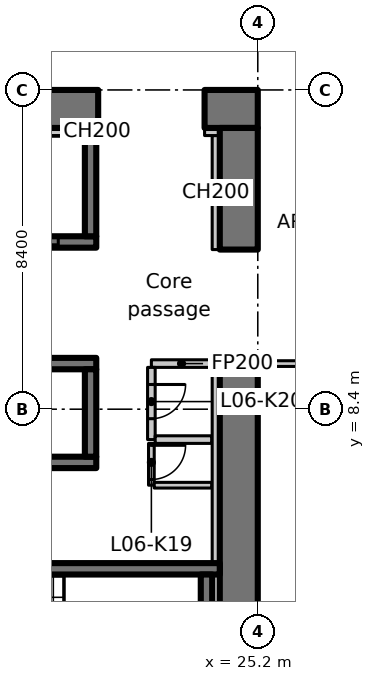
"""IFC4 building model, lengths in metres.
Left out: names, types, materials, properties, quantities, classifications, styles, units other than length and angle.
Written with IfcOpenShell. Run it as: python <this file> out.ifc"""

import sys

from ifc_helpers import new_model, si_unit, direction, frame, frame_2d, origin, place, context, subcontext, project, spatial, rectangle, extrude, element, fill, save


model = new_model("IFC4")
c1 = context("Model", 3, precision=1e-05, world=origin(), true_north=direction((0.0, 1.0)))
c2 = subcontext(c1, "Body", "Model", "MODEL_VIEW")
j1 = project(units=[si_unit("LENGTHUNIT", "METRE"), si_unit("PLANEANGLEUNIT", "RADIAN")], contexts=[c1])
p1 = place(None, origin())
s1 = spatial("IfcSite", under=j1, at=p1, CompositionType="ELEMENT")
p2 = place(p1, origin())
s2 = spatial("IfcBuilding", under=s1, at=p2, CompositionType="ELEMENT")
p3 = place(p2, frame((0.0, 0.0, 36.5)))
s3 = spatial("IfcBuildingStorey", under=s2, at=p3, CompositionType="ELEMENT", Elevation=36.5)
p4 = place(p3, frame((-1.1, 16.3, 0.0), z_axis=(0.0, 0.0, 1.0), x_axis=(1.0, 0.0, 0.0)))
e1 = element("IfcWall", 1, at=p4, inside=s3, PredefinedType="SHEAR", context=c2, shape_type="SweptSolid", body=[
    extrude(rectangle(XDim=22.1, YDim=1.0, at=frame_2d((11.05, 0.0))), origin(), (0.0, 0.0, 1.0), 3.35),
])
p5 = place(p4, frame((3.15, 0.0, 0.0)))
e2 = element("IfcOpeningElement", 2, at=p5, cuts=e1, PredefinedType="OPENING", context=c2, shape_type="SweptSolid", body=[
    extrude(rectangle(XDim=1.1, YDim=2.3, at=frame_2d((0.55, 1.15))), frame((0.0, 0.51, 0.0), z_axis=(0.0, -1.0, 0.0), x_axis=(1.0, 0.0, 0.0)), (0.0, 0.0, 1.0), 1.02),
])
p6 = place(p3, frame((23.8, 16.3, 0.0), z_axis=(0.0, 0.0, 1.0), x_axis=(1.0, 0.0, 0.0)))
e3 = element("IfcWall", 3, at=p6, inside=s3, PredefinedType="SHEAR", context=c2, shape_type="SweptSolid", body=[
    extrude(rectangle(XDim=1.4, YDim=1.0, at=frame_2d((0.7, 0.0))), origin(), (0.0, 0.0, 1.0), 3.35),
])
p7 = place(p3, frame((24.7, 1.0, 0.0), z_axis=(0.0, 0.0, 1.0), x_axis=(0.0, 1.0, 0.0)))
e4 = element("IfcWall", 4, at=p7, inside=s3, PredefinedType="SHEAR", context=c2, shape_type="SweptSolid", body=[
    extrude(rectangle(XDim=8.8, YDim=1.0, at=frame_2d((4.4, 0.0))), origin(), (0.0, 0.0, 1.0), 3.35),
])
p8 = place(p3, frame((24.7, 12.6, 0.0), z_axis=(0.0, 0.0, 1.0), x_axis=(0.0, 1.0, 0.0)))
e5 = element("IfcWall", 5, at=p8, inside=s3, PredefinedType="SHEAR", context=c2, shape_type="SweptSolid", body=[
    extrude(rectangle(XDim=3.2, YDim=1.0, at=frame_2d((1.6, 0.0))), origin(), (0.0, 0.0, 1.0), 3.35),
])
p9 = place(p3, frame((24.1, 12.6, 0.0), z_axis=(0.0, 0.0, 1.0), x_axis=(0.0, 1.0, 0.0)))
e6 = element("IfcWall", 6, at=p9, inside=s3, PredefinedType="PARTITIONING", context=c2, shape_type="SweptSolid", body=[
    extrude(rectangle(XDim=3.0, YDim=0.2, at=frame_2d((1.5, 0.0))), origin(), (0.0, 0.0, 1.0), 3.35),
])
p10 = place(p3, frame((23.8, 15.7, 0.0), z_axis=(0.0, 0.0, 1.0), x_axis=(1.0, 0.0, 0.0)))
e7 = element("IfcWall", 7, at=p10, inside=s3, PredefinedType="PARTITIONING", context=c2, shape_type="SweptSolid", body=[
    extrude(rectangle(XDim=0.4, YDim=0.2, at=frame_2d((0.2, 0.0))), origin(), (0.0, 0.0, 1.0), 3.35),
])
p11 = place(p3, frame((1.0, 7.0, 0.0), z_axis=(0.0, 0.0, 1.0), x_axis=(1.0, 0.0, 0.0)))
e8 = element("IfcWall", 8, at=p11, inside=s3, PredefinedType="SHEAR", context=c2, shape_type="SweptSolid", body=[
    extrude(rectangle(XDim=19.95, YDim=0.3, at=frame_2d((9.975, 0.0))), origin(), (0.0, 0.0, 1.0), 3.35),
])
p12 = place(p3, frame((1.0, 9.6, 0.0), z_axis=(0.0, 0.0, 1.0), x_axis=(1.0, 0.0, 0.0)))
e9 = element("IfcWall", 9, at=p12, inside=s3, PredefinedType="SHEAR", context=c2, shape_type="SweptSolid", body=[
    extrude(rectangle(XDim=19.95, YDim=0.3, at=frame_2d((9.975, 0.0))), origin(), (0.0, 0.0, 1.0), 3.35),
])
p13 = place(p12, frame((1.05, 0.0, 0.0)))
e10 = element("IfcOpeningElement", 10, at=p13, cuts=e9, PredefinedType="OPENING", context=c2, shape_type="SweptSolid", body=[
    extrude(rectangle(XDim=1.1, YDim=2.3, at=frame_2d((0.55, 1.15))), frame((0.0, 0.16, 0.0), z_axis=(0.0, -1.0, 0.0), x_axis=(1.0, 0.0, 0.0)), (0.0, 0.0, 1.0), 0.32),
])
p14 = place(p12, frame((3.85, 0.0, 0.0)))
e11 = element("IfcOpeningElement", 11, at=p14, cuts=e9, PredefinedType="OPENING", context=c2, shape_type="SweptSolid", body=[
    extrude(rectangle(XDim=1.1, YDim=2.3, at=frame_2d((0.55, 1.15))), frame((0.0, 0.16, 0.0), z_axis=(0.0, -1.0, 0.0), x_axis=(1.0, 0.0, 0.0)), (0.0, 0.0, 1.0), 0.32),
])
p15 = place(p12, frame((6.65, 0.0, 0.0)))
e12 = element("IfcOpeningElement", 12, at=p15, cuts=e9, PredefinedType="OPENING", context=c2, shape_type="SweptSolid", body=[
    extrude(rectangle(XDim=1.1, YDim=2.3, at=frame_2d((0.55, 1.15))), frame((0.0, 0.16, 0.0), z_axis=(0.0, -1.0, 0.0), x_axis=(1.0, 0.0, 0.0)), (0.0, 0.0, 1.0), 0.32),
])
p16 = place(p12, frame((9.45, 0.0, 0.0)))
e13 = element("IfcOpeningElement", 13, at=p16, cuts=e9, PredefinedType="OPENING", context=c2, shape_type="SweptSolid", body=[
    extrude(rectangle(XDim=1.1, YDim=2.3, at=frame_2d((0.55, 1.15))), frame((0.0, 0.16, 0.0), z_axis=(0.0, -1.0, 0.0), x_axis=(1.0, 0.0, 0.0)), (0.0, 0.0, 1.0), 0.32),
])
p17 = place(p12, frame((12.25, 0.0, 0.0)))
e14 = element("IfcOpeningElement", 14, at=p17, cuts=e9, PredefinedType="OPENING", context=c2, shape_type="SweptSolid", body=[
    extrude(rectangle(XDim=1.1, YDim=2.3, at=frame_2d((0.55, 1.15))), frame((0.0, 0.16, 0.0), z_axis=(0.0, -1.0, 0.0), x_axis=(1.0, 0.0, 0.0)), (0.0, 0.0, 1.0), 0.32),
])
p18 = place(p12, frame((15.05, 0.0, 0.0)))
e15 = element("IfcOpeningElement", 15, at=p18, cuts=e9, PredefinedType="OPENING", context=c2, shape_type="SweptSolid", body=[
    extrude(rectangle(XDim=1.1, YDim=2.3, at=frame_2d((0.55, 1.15))), frame((0.0, 0.16, 0.0), z_axis=(0.0, -1.0, 0.0), x_axis=(1.0, 0.0, 0.0)), (0.0, 0.0, 1.0), 0.32),
])
p19 = place(p3, frame((20.8, 7.15, 0.0), z_axis=(0.0, 0.0, 1.0), x_axis=(0.0, 1.0, 0.0)))
e16 = element("IfcWall", 16, at=p19, inside=s3, PredefinedType="SHEAR", context=c2, shape_type="SweptSolid", body=[
    extrude(rectangle(XDim=2.3, YDim=0.3, at=frame_2d((1.15, 0.0))), origin(), (0.0, 0.0, 1.0), 3.35),
])
p20 = place(p3, frame((15.05, 12.8, 0.0), z_axis=(0.0, 0.0, 1.0), x_axis=(1.0, 0.0, 0.0)))
e17 = element("IfcWall", 17, at=p20, inside=s3, PredefinedType="SHEAR", context=c2, shape_type="SweptSolid", body=[
    extrude(rectangle(XDim=5.9, YDim=0.3, at=frame_2d((2.95, 0.0))), origin(), (0.0, 0.0, 1.0), 3.35),
])
p21 = place(p20, frame((3.8, 0.0, 0.0)))
e18 = element("IfcOpeningElement", 18, at=p21, cuts=e17, PredefinedType="OPENING", context=c2, shape_type="SweptSolid", body=[
    extrude(rectangle(XDim=1.1, YDim=2.3, at=frame_2d((0.55, 1.15))), frame((0.0, 0.16, 0.0), z_axis=(0.0, -1.0, 0.0), x_axis=(1.0, 0.0, 0.0)), (0.0, 0.0, 1.0), 0.32),
])
p22 = place(p3, frame((20.8, 12.95, 0.0), z_axis=(0.0, 0.0, 1.0), x_axis=(0.0, 1.0, 0.0)))
e19 = element("IfcWall", 19, at=p22, inside=s3, PredefinedType="SHEAR", context=c2, shape_type="SweptSolid", body=[
    extrude(rectangle(XDim=2.85, YDim=0.3, at=frame_2d((1.425, 0.0))), origin(), (0.0, 0.0, 1.0), 3.35),
])
p23 = place(p3, frame((15.8, 4.2, 0.0), z_axis=(0.0, 0.0, 1.0), x_axis=(1.0, 0.0, 0.0)))
e20 = element("IfcWall", 20, at=p23, inside=s3, PredefinedType="SHEAR", context=c2, shape_type="SweptSolid", body=[
    extrude(rectangle(XDim=8.4, YDim=0.3, at=frame_2d((4.2, 0.0))), origin(), (0.0, 0.0, 1.0), 3.35),
])
p24 = place(p23, frame((0.4, 0.0, 0.0)))
e21 = element("IfcOpeningElement", 21, at=p24, cuts=e20, PredefinedType="OPENING", context=c2, shape_type="SweptSolid", body=[
    extrude(rectangle(XDim=1.0, YDim=2.1, at=frame_2d((0.5, 1.05))), frame((0.0, 0.16, 0.0), z_axis=(0.0, -1.0, 0.0), x_axis=(1.0, 0.0, 0.0)), (0.0, 0.0, 1.0), 0.32),
])
p25 = place(p3, frame((23.85, 1.5, 0.0), z_axis=(0.0, 0.0, 1.0), x_axis=(0.0, 1.0, 0.0)))
e22 = element("IfcWall", 22, at=p25, inside=s3, PredefinedType="SHEAR", context=c2, shape_type="SweptSolid", body=[
    extrude(rectangle(XDim=2.55, YDim=0.3, at=frame_2d((1.275, 0.0))), origin(), (0.0, 0.0, 1.0), 3.35),
])
p26 = place(p3, frame((23.988, 9.6, 0.0), z_axis=(0.0, 0.0, 1.0), x_axis=(-1.0, 0.0, 0.0)))
e23 = element("IfcWall", 23, at=p26, inside=s3, PredefinedType="PARTITIONING", context=c2, shape_type="SweptSolid", body=[
    extrude(rectangle(XDim=1.588, YDim=0.2, at=frame_2d((0.794, 0.0))), origin(), (0.0, 0.0, 1.0), 3.35),
])
p27 = place(p3, frame((22.4, 9.5, 0.0), z_axis=(0.0, 0.0, 1.0), x_axis=(0.0, -1.0, 0.0)))
e24 = element("IfcWall", 24, at=p27, inside=s3, PredefinedType="PARTITIONING", context=c2, shape_type="SweptSolid", body=[
    extrude(rectangle(XDim=1.9, YDim=0.2, at=frame_2d((0.95, 0.0))), origin(), (0.0, 0.0, 1.0), 3.35),
])
p28 = place(p27, frame((0.45, 0.0, 0.0)))
e25 = element("IfcOpeningElement", 25, at=p28, cuts=e24, PredefinedType="OPENING", context=c2, shape_type="SweptSolid", body=[
    extrude(rectangle(XDim=0.9, YDim=2.1, at=frame_2d((0.45, 1.05))), frame((0.0, 0.11, 0.0), z_axis=(0.0, -1.0, 0.0), x_axis=(1.0, 0.0, 0.0)), (0.0, 0.0, 1.0), 0.22),
])
p29 = place(p3, frame((22.5, 7.6, 0.0), z_axis=(0.0, 0.0, 1.0), x_axis=(1.0, 0.0, 0.0)))
e26 = element("IfcWall", 26, at=p29, inside=s3, PredefinedType="PARTITIONING", context=c2, shape_type="SweptSolid", body=[
    extrude(rectangle(XDim=1.488, YDim=0.2, at=frame_2d((0.744, 0.0))), origin(), (0.0, 0.0, 1.0), 3.35),
])
p30 = place(p3, frame((22.4, 7.5, 0.0), z_axis=(0.0, 0.0, 1.0), x_axis=(0.0, -1.0, 0.0)))
e27 = element("IfcWall", 27, at=p30, inside=s3, PredefinedType="PARTITIONING", context=c2, shape_type="SweptSolid", body=[
    extrude(rectangle(XDim=1.1, YDim=0.15, at=frame_2d((0.55, 0.0))), origin(), (0.0, 0.0, 1.0), 3.35),
])
p31 = place(p30, frame((0.05, 0.0, 0.0)))
e28 = element("IfcOpeningElement", 28, at=p31, cuts=e27, PredefinedType="OPENING", context=c2, shape_type="SweptSolid", body=[
    extrude(rectangle(XDim=0.9, YDim=2.1, at=frame_2d((0.45, 1.05))), frame((0.0, 0.085, 0.0), z_axis=(0.0, -1.0, 0.0), x_axis=(1.0, 0.0, 0.0)), (0.0, 0.0, 1.0), 0.17),
])
p32 = place(p3, frame((22.475, 6.4, 0.0), z_axis=(0.0, 0.0, 1.0), x_axis=(1.0, 0.0, 0.0)))
e29 = element("IfcWall", 29, at=p32, inside=s3, PredefinedType="PARTITIONING", context=c2, shape_type="SweptSolid", body=[
    extrude(rectangle(XDim=1.513, YDim=0.15, at=frame_2d((0.756, 0.0))), origin(), (0.0, 0.0, 1.0), 3.35),
])
p33 = place(p3, frame((18.15, 15.7, 0.0), z_axis=(0.0, 0.0, 1.0), x_axis=(1.0, 0.0, 0.0)))
e30 = element("IfcWall", 30, at=p33, inside=s3, PredefinedType="PARTITIONING", context=c2, shape_type="SweptSolid", body=[
    extrude(rectangle(XDim=2.5, YDim=0.2, at=frame_2d((1.25, 0.0))), origin(), (0.0, 0.0, 1.0), 3.35),
])
p34 = place(p3, frame((20.95, 15.7, 0.0), z_axis=(0.0, 0.0, 1.0), x_axis=(1.0, 0.0, 0.0)))
e31 = element("IfcWall", 31, at=p34, inside=s3, PredefinedType="PARTITIONING", context=c2, shape_type="SweptSolid", body=[
    extrude(rectangle(XDim=0.05, YDim=0.2, at=frame_2d((0.025, 0.0))), origin(), (0.0, 0.0, 1.0), 3.35),
])
p35 = place(p3, frame((24.1, 1.5, 0.0), z_axis=(0.0, 0.0, 1.0), x_axis=(0.0, 1.0, 0.0)))
e32 = element("IfcWall", 32, at=p35, inside=s3, PredefinedType="PARTITIONING", context=c2, shape_type="SweptSolid", body=[
    extrude(rectangle(XDim=2.55, YDim=0.2, at=frame_2d((1.275, 0.0))), origin(), (0.0, 0.0, 1.0), 3.35),
])
p36 = place(p3, frame((24.1, 4.35, 0.0), z_axis=(0.0, 0.0, 1.0), x_axis=(0.0, 1.0, 0.0)))
e33 = element("IfcWall", 33, at=p36, inside=s3, PredefinedType="PARTITIONING", context=c2, shape_type="SweptSolid", body=[
    extrude(rectangle(XDim=5.45, YDim=0.2, at=frame_2d((2.725, 0.0))), origin(), (0.0, 0.0, 1.0), 3.35),
])
p37 = place(p3, frame((29.4, 9.6, 0.0), z_axis=(0.0, 0.0, 1.0), x_axis=(-1.0, 0.0, 0.0)))
e34 = element("IfcWall", 34, at=p37, inside=s3, PredefinedType="PARTITIONING", context=c2, shape_type="SweptSolid", body=[
    extrude(rectangle(XDim=4.2, YDim=0.15, at=frame_2d((2.1, 0.0))), origin(), (0.0, 0.0, 1.0), 3.33),
])
p38 = place(p21, origin())
e35 = element("IfcDoor", 35, at=p38, inside=s3, OperationType="SLIDING_TO_LEFT", PredefinedType="DOOR", context=c2, shape_type="SweptSolid", body=[
    extrude(rectangle(XDim=1.1, YDim=2.3, at=frame_2d((0.55, 1.15))), frame((0.0, 0.025, 0.0), z_axis=(0.0, -1.0, 0.0), x_axis=(1.0, 0.0, 0.0)), (0.0, 0.0, 1.0), 0.05),
])
fill(e18, e35)
p39 = place(p31, origin())
e36 = element("IfcDoor", 36, at=p39, inside=s3, OperationType="SINGLE_SWING_LEFT", PredefinedType="DOOR", context=c2, shape_type="SweptSolid", body=[
    extrude(rectangle(XDim=0.9, YDim=2.1, at=frame_2d((0.45, 1.05))), frame((0.0, 0.025, 0.0), z_axis=(0.0, -1.0, 0.0), x_axis=(1.0, 0.0, 0.0)), (0.0, 0.0, 1.0), 0.05),
])
fill(e28, e36)
p40 = place(p28, origin())
e37 = element("IfcDoor", 37, at=p40, inside=s3, OperationType="SINGLE_SWING_RIGHT", PredefinedType="DOOR", context=c2, shape_type="SweptSolid", body=[
    extrude(rectangle(XDim=0.9, YDim=2.1, at=frame_2d((0.45, 1.05))), frame((0.0, 0.025, 0.0), z_axis=(0.0, -1.0, 0.0), x_axis=(1.0, 0.0, 0.0)), (0.0, 0.0, 1.0), 0.05),
])
fill(e25, e37)
save(model, sys.argv[1])
